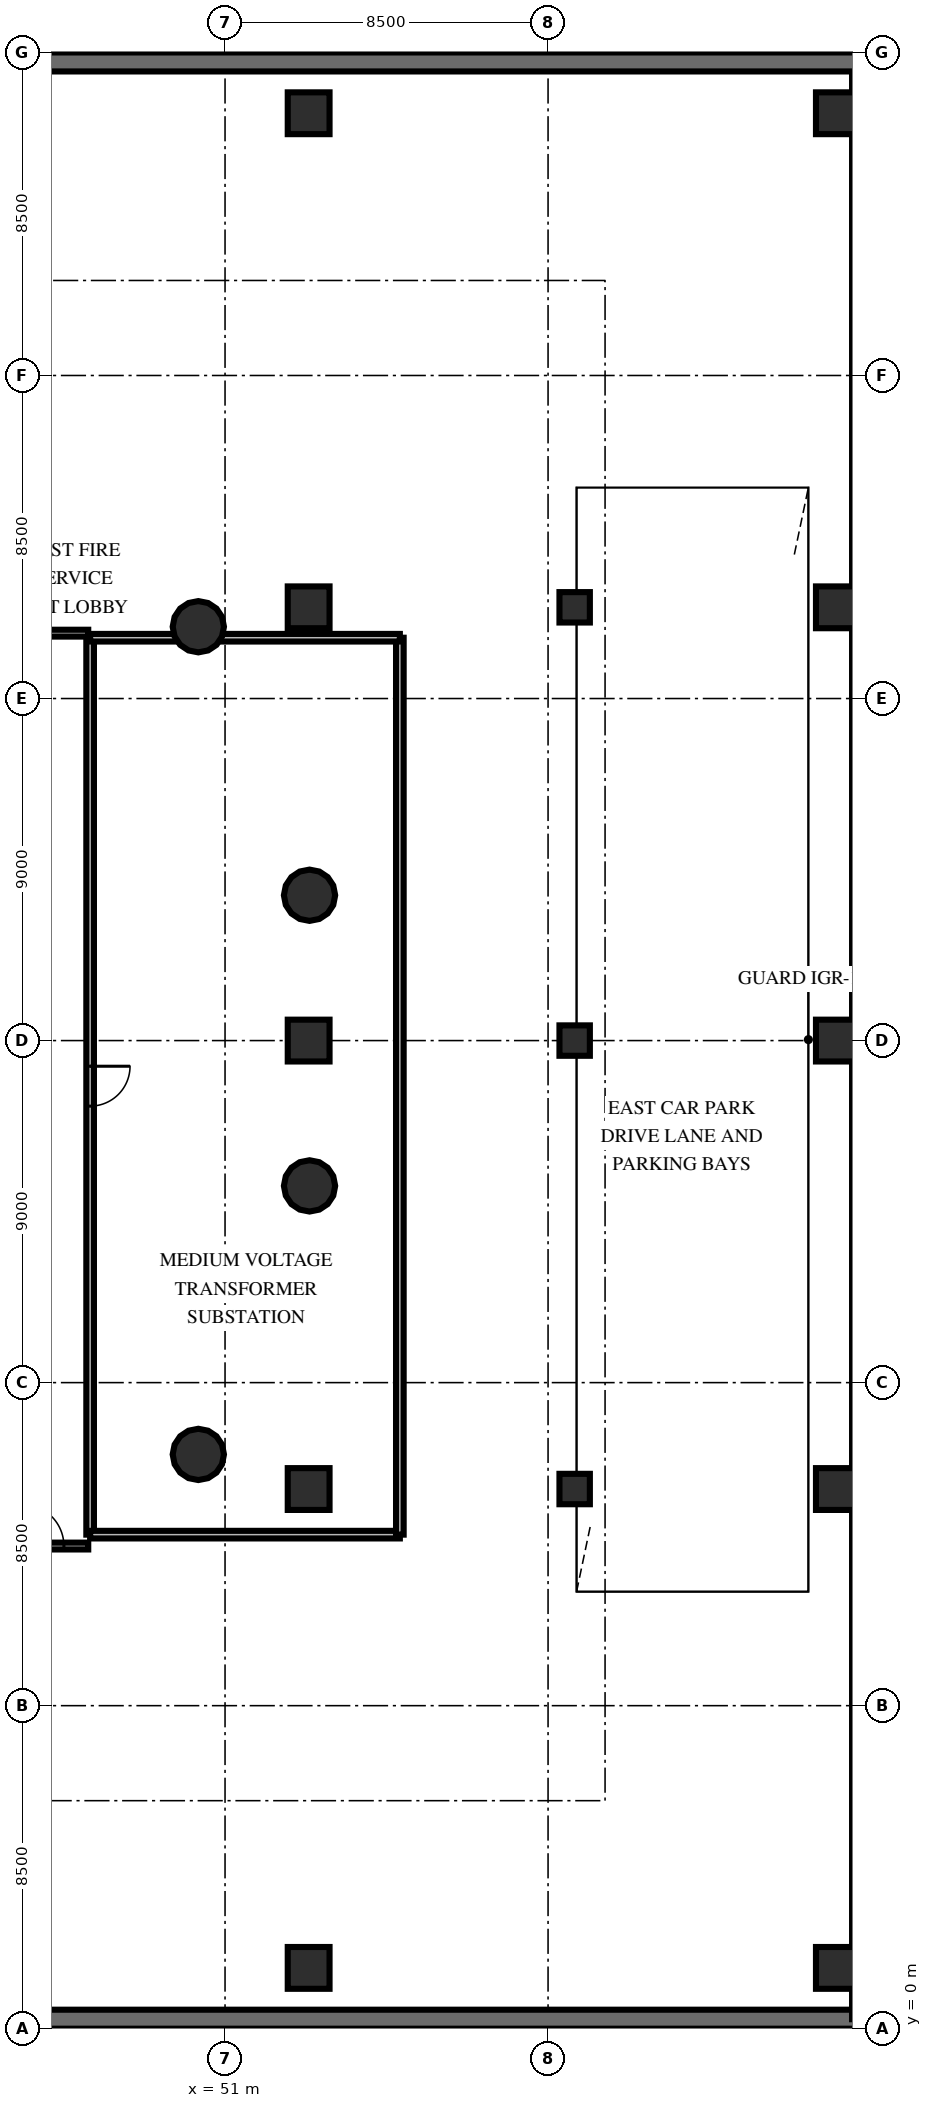
"""IFC4 building model, lengths in metres.
Left out: names, types, materials, properties, quantities, classifications, styles, units other than length and angle.
Written with IfcOpenShell. Run it as: python <this file> out.ifc"""

import sys

from ifc_helpers import new_model, si_unit, direction, frame, frame_2d, origin, origin_2d, place, context, subcontext, project, spatial, rectangle, circle, extrude, element, fill, save


model = new_model("IFC4")
c1 = context("Model", 3, precision=1e-05, world=origin(), true_north=direction((0.0, 1.0)))
c2 = subcontext(c1, "Body", "Model", "MODEL_VIEW")
j1 = project(units=[si_unit("LENGTHUNIT", "METRE"), si_unit("PLANEANGLEUNIT", "RADIAN")], contexts=[c1])
p1 = place(None, origin())
s1 = spatial("IfcSite", under=j1, at=p1, CompositionType="ELEMENT")
p2 = place(p1, origin())
s2 = spatial("IfcBuilding", under=s1, at=p2, CompositionType="ELEMENT")
p3 = place(p2, frame((0.0, 0.0, -4.8)))
s3 = spatial("IfcBuildingStorey", under=s2, at=p3, CompositionType="ELEMENT", Elevation=-4.8)
for number, where, z_axis, x_axis in (
    (1, (0.25, 0.25, 0.0), (0.0, 0.0, 1.0), (1.0, 0.0, 0.0)),
    (2, (67.75, 51.75, 0.0), (0.0, 0.0, 1.0), (-1.0, 0.0, 0.0)),
):
    element("IfcWall", number, at=place(p3, frame(where, z_axis=z_axis, x_axis=x_axis)), inside=s3, PredefinedType="SOLIDWALL", context=c2, shape_type="SweptSolid", body=[
        extrude(rectangle(XDim=67.5, YDim=0.5, at=frame_2d((33.75, 0.0))), origin(), (0.0, 0.0, 1.0), 4.8),
    ])
for number, where, z_axis, x_axis in (
    (3, (53.2, 1.6, 0.0), (0.0, 0.0, 1.0), (1.0, 0.0, 0.0)),
    (4, (53.2, 14.2, 0.0), (0.0, 0.0, 1.0), (1.0, 0.0, 0.0)),
    (5, (53.2, 26.0, 0.0), (0.0, 0.0, 1.0), (1.0, 0.0, 0.0)),
    (6, (53.2, 37.4, 0.0), (0.0, 0.0, 1.0), (1.0, 0.0, 0.0)),
    (7, (53.2, 50.4, 0.0), (0.0, 0.0, 1.0), (1.0, 0.0, 0.0)),
    (8, (67.1, 1.6, 0.0), (0.0, 0.0, 1.0), (1.0, 0.0, 0.0)),
    (9, (67.1, 14.2, 0.0), (0.0, 0.0, 1.0), (1.0, 0.0, 0.0)),
    (10, (67.1, 26.0, 0.0), (0.0, 0.0, 1.0), (1.0, 0.0, 0.0)),
    (11, (67.1, 37.4, 0.0), (0.0, 0.0, 1.0), (1.0, 0.0, 0.0)),
    (12, (67.1, 50.4, 0.0), (0.0, 0.0, 1.0), (1.0, 0.0, 0.0)),
):
    element("IfcColumn", number, at=place(p3, frame(where, z_axis=z_axis, x_axis=x_axis)), inside=s3, PredefinedType="COLUMN", context=c2, shape_type="SweptSolid", body=[
        extrude(rectangle(XDim=1.1, YDim=1.1, at=origin_2d()), origin(), (0.0, 0.0, 1.0), 4.8),
    ])
for number, where, z_axis, x_axis in (
    (13, (53.223, 29.824, 0.0), (0.0, 0.0, 1.0), (1.0, 0.0, 0.0)),
    (14, (50.297, 36.889, 0.0), (0.0, 0.0, 1.0), (1.0, 0.0, 0.0)),
    (15, (50.297, 15.111, 0.0), (0.0, 0.0, 1.0), (1.0, 0.0, 0.0)),
    (16, (53.223, 22.176, 0.0), (0.0, 0.0, 1.0), (1.0, 0.0, 0.0)),
):
    element("IfcColumn", number, at=place(p3, frame(where, z_axis=z_axis, x_axis=x_axis)), inside=s3, PredefinedType="COLUMN", context=c2, shape_type="SweptSolid", body=[
        extrude(circle(Radius=0.675, at=origin_2d()), origin(), (0.0, 0.0, 1.0), 4.8),
    ])
for number, where, z_axis, x_axis in (
    (17, (60.2, 14.2, 0.0), (0.0, 0.0, 1.0), (1.0, 0.0, 0.0)),
    (18, (60.2, 26.0, 0.0), (0.0, 0.0, 1.0), (1.0, 0.0, 0.0)),
    (19, (60.2, 37.4, 0.0), (0.0, 0.0, 1.0), (1.0, 0.0, 0.0)),
):
    element("IfcColumn", number, at=place(p3, frame(where, z_axis=z_axis, x_axis=x_axis)), inside=s3, PredefinedType="COLUMN", context=c2, shape_type="SweptSolid", body=[
        extrude(rectangle(XDim=0.8, YDim=0.8, at=origin_2d()), origin(), (0.0, 0.0, 1.0), 4.8),
    ])
p4 = place(p3, frame((11.95, 36.72, 0.0), z_axis=(0.0, 0.0, 1.0), x_axis=(1.0, 0.0, 0.0)))
e20 = element("IfcWall", 20, at=p4, inside=s3, PredefinedType="PARTITIONING", context=c2, shape_type="SweptSolid", body=[
    extrude(rectangle(XDim=35.45, YDim=0.18, at=frame_2d((17.725, 0.0))), origin(), (0.0, 0.0, 1.0), 3.56),
])
p5 = place(p4, frame((6.5, 0.0, 0.0)))
e21 = element("IfcOpeningElement", 21, at=p5, cuts=e20, PredefinedType="OPENING", context=c2, shape_type="SweptSolid", body=[
    extrude(rectangle(XDim=1.1, YDim=2.15, at=frame_2d((0.55, 1.075))), frame((0.0, 0.1, 0.0), z_axis=(0.0, -1.0, 0.0), x_axis=(1.0, 0.0, 0.0)), (0.0, 0.0, 1.0), 0.2),
])
p6 = place(p3, frame((45.01, 12.7, 0.0), z_axis=(0.0, 0.0, 1.0), x_axis=(1.0, 0.0, 0.0)))
e22 = element("IfcWall", 22, at=p6, inside=s3, PredefinedType="PARTITIONING", context=c2, shape_type="SweptSolid", body=[
    extrude(rectangle(XDim=2.39, YDim=0.18, at=frame_2d((1.195, 0.0))), origin(), (0.0, 0.0, 1.0), 3.56),
])
p7 = place(p6, frame((0.65, 0.0, 0.0)))
e23 = element("IfcOpeningElement", 23, at=p7, cuts=e22, PredefinedType="OPENING", context=c2, shape_type="SweptSolid", body=[
    extrude(rectangle(XDim=1.1, YDim=2.15, at=frame_2d((0.55, 1.075))), frame((0.0, 0.1, 0.0), z_axis=(0.0, -1.0, 0.0), x_axis=(1.0, 0.0, 0.0)), (0.0, 0.0, 1.0), 0.2),
])
p8 = place(p3, frame((47.45, 36.6, 0.0), z_axis=(0.0, 0.0, 1.0), x_axis=(0.0, -1.0, 0.0)))
e24 = element("IfcWall", 24, at=p8, inside=s3, PredefinedType="SOLIDWALL", context=c2, shape_type="SweptSolid", body=[
    extrude(rectangle(XDim=23.6, YDim=0.2, at=frame_2d((11.8, 0.0))), origin(), (0.0, 0.0, 1.0), 3.56),
])
p9 = place(p8, frame((11.275, 0.0, 0.0)))
e25 = element("IfcOpeningElement", 25, at=p9, cuts=e24, PredefinedType="OPENING", context=c2, shape_type="SweptSolid", body=[
    extrude(rectangle(XDim=1.05, YDim=2.15, at=frame_2d((0.525, 1.075))), frame((0.0, 0.11, 0.0), z_axis=(0.0, -1.0, 0.0), x_axis=(1.0, 0.0, 0.0)), (0.0, 0.0, 1.0), 0.22),
])
p10 = place(p3, frame((47.45, 13.0, 0.0), z_axis=(0.0, 0.0, 1.0), x_axis=(1.0, 0.0, 0.0)))
e26 = element("IfcWall", 26, at=p10, inside=s3, PredefinedType="SOLIDWALL", context=c2, shape_type="SweptSolid", body=[
    extrude(rectangle(XDim=8.15, YDim=0.2, at=frame_2d((4.075, 0.0))), origin(), (0.0, 0.0, 1.0), 3.56),
])
p11 = place(p3, frame((55.6, 13.0, 0.0), z_axis=(0.0, 0.0, 1.0), x_axis=(0.0, 1.0, 0.0)))
e27 = element("IfcWall", 27, at=p11, inside=s3, PredefinedType="SOLIDWALL", context=c2, shape_type="SweptSolid", body=[
    extrude(rectangle(XDim=23.6, YDim=0.2, at=frame_2d((11.8, 0.0))), origin(), (0.0, 0.0, 1.0), 3.56),
])
p12 = place(p3, frame((55.6, 36.6, 0.0), z_axis=(0.0, 0.0, 1.0), x_axis=(-1.0, 0.0, 0.0)))
e28 = element("IfcWall", 28, at=p12, inside=s3, PredefinedType="SOLIDWALL", context=c2, shape_type="SweptSolid", body=[
    extrude(rectangle(XDim=8.15, YDim=0.2, at=frame_2d((4.075, 0.0))), origin(), (0.0, 0.0, 1.0), 3.56),
])
p13 = place(p7, origin())
e29 = element("IfcDoor", 29, at=p13, inside=s3, OperationType="SINGLE_SWING_LEFT", PredefinedType="DOOR", context=c2, shape_type="SweptSolid", body=[
    extrude(rectangle(XDim=1.1, YDim=2.15, at=frame_2d((0.55, 1.075))), frame((0.0, 0.025, 0.0), z_axis=(0.0, -1.0, 0.0), x_axis=(1.0, 0.0, 0.0)), (0.0, 0.0, 1.0), 0.05),
])
fill(e23, e29)
p14 = place(p9, origin())
e30 = element("IfcDoor", 30, at=p14, inside=s3, OperationType="SINGLE_SWING_LEFT", PredefinedType="DOOR", context=c2, shape_type="SweptSolid", body=[
    extrude(rectangle(XDim=1.05, YDim=2.15, at=frame_2d((0.525, 1.075))), frame((0.0, 0.025, 0.0), z_axis=(0.0, -1.0, 0.0), x_axis=(1.0, 0.0, 0.0)), (0.0, 0.0, 1.0), 0.05),
])
fill(e25, e30)
save(model, sys.argv[1])
